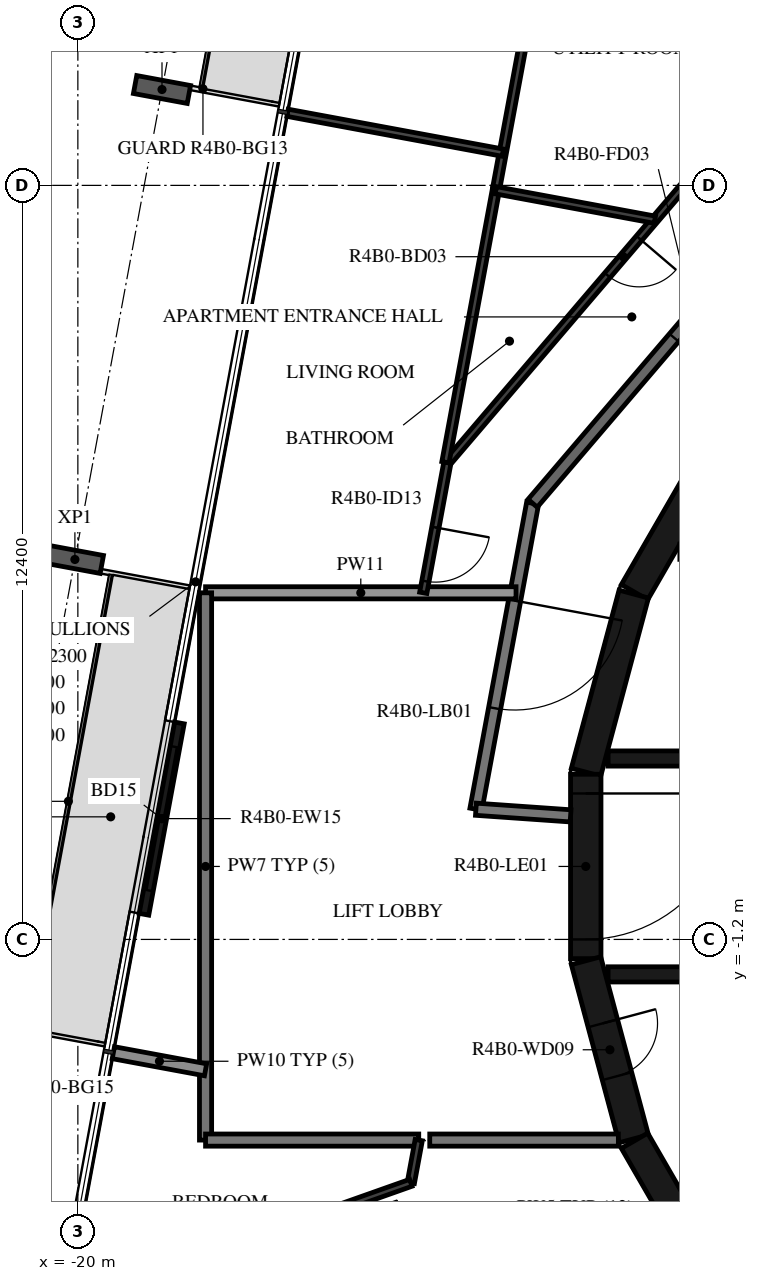
"""IFC4 building model, lengths in metres.
Left out: names, types, materials, properties, quantities, classifications, styles, units other than length and angle.
Written with IfcOpenShell. Run it as: python <this file> out.ifc"""

import sys

from ifc_helpers import new_model, si_unit, direction, frame, frame_2d, origin, origin_2d, place, context, subcontext, project, spatial, rectangle, i_section, extrude, element, fill, save


model = new_model("IFC4")
c1 = context("Model", 3, precision=1e-05, world=origin(), true_north=direction((0.0, 1.0)))
c2 = subcontext(c1, "Body", "Model", "MODEL_VIEW")
j1 = project(units=[si_unit("LENGTHUNIT", "METRE"), si_unit("PLANEANGLEUNIT", "RADIAN")], contexts=[c1])
p1 = place(None, origin())
s1 = spatial("IfcSite", under=j1, at=p1, CompositionType="ELEMENT")
p2 = place(p1, origin())
s2 = spatial("IfcBuilding", under=s1, at=p2, CompositionType="ELEMENT")
p3 = place(p2, frame((0.0, 0.0, 165.7)))
s3 = spatial("IfcBuildingStorey", under=s2, at=p3, CompositionType="ELEMENT", Elevation=165.7)
for number, where, z_axis, x_axis in (
    (1, (-18.616, 12.777, -0.38), (0.0, 0.0, 1.0), (0.182, 0.983, 0.0)),
    (2, (-20.049, 5.048, -0.38), (0.0, 0.0, 1.0), (0.182, 0.983, 0.0)),
):
    element("IfcColumn", number, at=place(p3, frame(where, z_axis=z_axis, x_axis=x_axis)), inside=s3, PredefinedType="COLUMN", context=c2, shape_type="SweptSolid", body=[
        extrude(i_section(OverallWidth=0.3, OverallDepth=0.9, WebThickness=0.019, FlangeThickness=0.035, FilletRadius=0.03, at=origin_2d()), origin(), (0.0, 0.0, 1.0), 3.5),
    ])
p4 = place(p3, frame((-18.33, 2.36, 0.0), z_axis=(0.0, 0.0, 1.0), x_axis=(-0.18226136951, -0.983250117307, 0.0)))
e3 = element("IfcWall", 3, at=p4, inside=s3, PredefinedType="STANDARD", context=c2, shape_type="SweptSolid", body=[
    extrude(rectangle(XDim=3.2, YDim=0.16, at=frame_2d((1.6, 0.0))), origin(), (0.0, 0.0, 1.0), 3.12),
])
p5 = place(p4, frame((0.4, 0.0, 0.0)))
e4 = element("IfcOpeningElement", 4, at=p5, cuts=e3, PredefinedType="OPENING", context=c2, shape_type="SweptSolid", body=[
    extrude(rectangle(XDim=2.4, YDim=2.4, at=frame_2d((1.2, 1.2))), frame((0.0, 0.09, 0.0), z_axis=(0.0, -1.0, 0.0), x_axis=(1.0, 0.0, 0.0)), (0.0, 0.0, 1.0), 0.18),
])
for number, where, z_axis, x_axis in (
    (5, (-9.329, 7.137, 0.0), (0.0, 0.0, 1.0), (-0.5, -0.866, 0.0)),
    (6, (-10.858, 4.479, 0.0), (0.0, 0.0, 1.0), (-0.259, -0.966, 0.0)),
):
    element("IfcWall", number, at=place(p3, frame(where, z_axis=z_axis, x_axis=x_axis)), inside=s3, PredefinedType="SHEAR", context=c2, shape_type="SweptSolid", body=[
        extrude(rectangle(XDim=3.033, YDim=0.5, at=frame_2d((1.516, 0.0))), origin(), (0.0, 0.0, 1.0), 3.12),
    ])
p6 = place(p3, frame((-11.647, 1.516, 0.0), z_axis=(0.0, 0.0, 1.0), x_axis=(0.0, -1.0, 0.0)))
e7 = element("IfcWall", 7, at=p6, inside=s3, PredefinedType="SHEAR", context=c2, shape_type="SweptSolid", body=[
    extrude(rectangle(XDim=3.033, YDim=0.5, at=frame_2d((1.516, 0.0))), origin(), (0.0, 0.0, 1.0), 3.12),
])
p7 = place(p6, frame((0.316, 0.0, 0.0)))
e8 = element("IfcOpeningElement", 8, at=p7, cuts=e7, PredefinedType="OPENING", context=c2, shape_type="SweptSolid", body=[
    extrude(rectangle(XDim=2.4, YDim=2.1, at=frame_2d((1.2, 1.05))), frame((0.0, 0.26, 0.0), z_axis=(0.0, -1.0, 0.0), x_axis=(1.0, 0.0, 0.0)), (0.0, 0.0, 1.0), 0.52),
])
p8 = place(p3, frame((-11.643, -1.55, 0.0), z_axis=(0.0, 0.0, 1.0), x_axis=(0.258734743916, -0.965948410781, 0.0)))
e9 = element("IfcWall", 9, at=p8, inside=s3, PredefinedType="SHEAR", context=c2, shape_type="SweptSolid", body=[
    extrude(rectangle(XDim=3.033, YDim=0.5, at=frame_2d((1.516, 0.0))), origin(), (0.0, 0.0, 1.0), 3.12),
])
p9 = place(p8, frame((1.066, 0.0, 0.0)))
e10 = element("IfcOpeningElement", 10, at=p9, cuts=e9, PredefinedType="OPENING", context=c2, shape_type="SweptSolid", body=[
    extrude(rectangle(XDim=0.9, YDim=2.1, at=frame_2d((0.45, 1.05))), frame((0.0, 0.26, 0.0), z_axis=(0.0, -1.0, 0.0), x_axis=(1.0, 0.0, 0.0)), (0.0, 0.0, 1.0), 0.52),
])
p10 = place(p3, frame((-10.845, -4.51, 0.0), z_axis=(0.0, 0.0, 1.0), x_axis=(0.500087131594, -0.865975092491, 0.0)))
e11 = element("IfcWall", 11, at=p10, inside=s3, PredefinedType="SHEAR", context=c2, shape_type="SweptSolid", body=[
    extrude(rectangle(XDim=3.033, YDim=0.5, at=frame_2d((1.516, 0.0))), origin(), (0.0, 0.0, 1.0), 3.12),
])
p11 = place(p3, frame((-11.28, 1.775, 0.0), z_axis=(0.0, 0.0, 1.0), x_axis=(1.0, 0.0, 0.0)))
e12 = element("IfcWall", 12, at=p11, inside=s3, PredefinedType="SHEAR", context=c2, shape_type="SweptSolid", body=[
    extrude(rectangle(XDim=14.38, YDim=0.25, at=frame_2d((7.19, 0.0))), origin(), (0.0, 0.0, 1.0), 3.12),
])
p12 = place(p11, frame((10.73, 0.0, 0.0)))
e13 = element("IfcOpeningElement", 13, at=p12, cuts=e12, PredefinedType="OPENING", context=c2, shape_type="SweptSolid", body=[
    extrude(rectangle(XDim=1.1, YDim=2.1, at=frame_2d((0.55, 1.05))), frame((0.0, 0.135, 0.0), z_axis=(0.0, -1.0, 0.0), x_axis=(1.0, 0.0, 0.0)), (0.0, 0.0, 1.0), 0.27),
])
p13 = place(p11, frame((12.88, 0.0, 0.0)))
e14 = element("IfcOpeningElement", 14, at=p13, cuts=e12, PredefinedType="OPENING", context=c2, shape_type="SweptSolid", body=[
    extrude(rectangle(XDim=1.1, YDim=2.1, at=frame_2d((0.55, 1.05))), frame((0.0, 0.135, 0.0), z_axis=(0.0, -1.0, 0.0), x_axis=(1.0, 0.0, 0.0)), (0.0, 0.0, 1.0), 0.27),
])
p14 = place(p11, frame((3.305, 0.0, 0.0)))
e15 = element("IfcOpeningElement", 15, at=p14, cuts=e12, PredefinedType="OPENING", context=c2, shape_type="SweptSolid", body=[
    extrude(rectangle(XDim=0.9, YDim=2.1, at=frame_2d((0.45, 1.05))), frame((0.0, 0.135, 0.0), z_axis=(0.0, -1.0, 0.0), x_axis=(1.0, 0.0, 0.0)), (0.0, 0.0, 1.0), 0.27),
])
p15 = place(p11, frame((7.605, 0.0, 0.0)))
e16 = element("IfcOpeningElement", 16, at=p15, cuts=e12, PredefinedType="OPENING", context=c2, shape_type="SweptSolid", body=[
    extrude(rectangle(XDim=0.9, YDim=2.1, at=frame_2d((0.45, 1.05))), frame((0.0, 0.135, 0.0), z_axis=(0.0, -1.0, 0.0), x_axis=(1.0, 0.0, 0.0)), (0.0, 0.0, 1.0), 0.27),
])
p16 = place(p3, frame((-11.28, -1.775, 0.0), z_axis=(0.0, 0.0, 1.0), x_axis=(1.0, 0.0, 0.0)))
e17 = element("IfcWall", 17, at=p16, inside=s3, PredefinedType="SHEAR", context=c2, shape_type="SweptSolid", body=[
    extrude(rectangle(XDim=14.38, YDim=0.25, at=frame_2d((7.19, 0.0))), origin(), (0.0, 0.0, 1.0), 3.12),
])
p17 = place(p16, frame((12.88, 0.0, 0.0)))
e18 = element("IfcOpeningElement", 18, at=p17, cuts=e17, PredefinedType="OPENING", context=c2, shape_type="SweptSolid", body=[
    extrude(rectangle(XDim=1.1, YDim=2.1, at=frame_2d((0.55, 1.05))), frame((0.0, 0.135, 0.0), z_axis=(0.0, -1.0, 0.0), x_axis=(1.0, 0.0, 0.0)), (0.0, 0.0, 1.0), 0.27),
])
p18 = place(p16, frame((8.68, 0.0, 0.0)))
e19 = element("IfcOpeningElement", 19, at=p18, cuts=e17, PredefinedType="OPENING", context=c2, shape_type="SweptSolid", body=[
    extrude(rectangle(XDim=0.9, YDim=2.1, at=frame_2d((0.45, 1.05))), frame((0.0, 0.135, 0.0), z_axis=(0.0, -1.0, 0.0), x_axis=(1.0, 0.0, 0.0)), (0.0, 0.0, 1.0), 0.27),
])
p19 = place(p3, frame((-12.521, 5.972, 0.0), z_axis=(0.0, 0.0, 1.0), x_axis=(-0.182251559718, -0.983251935661, 0.0)))
e20 = element("IfcWall", 20, at=p19, inside=s3, PredefinedType="STANDARD", context=c2, shape_type="SweptSolid", body=[
    extrude(rectangle(XDim=5.117, YDim=0.2, at=frame_2d((2.559, 0.0))), origin(), (0.0, 0.0, 1.0), 3.12),
])
p20 = place(p19, frame((1.627, 0.0, 0.0)))
e21 = element("IfcOpeningElement", 21, at=p20, cuts=e20, PredefinedType="OPENING", context=c2, shape_type="SweptSolid", body=[
    extrude(rectangle(XDim=1.8, YDim=2.1, at=frame_2d((0.9, 1.05))), frame((0.0, 0.11, 0.0), z_axis=(0.0, -1.0, 0.0), x_axis=(1.0, 0.0, 0.0)), (0.0, 0.0, 1.0), 0.22),
])
p21 = place(p3, frame((-13.454, 0.941, 0.0), z_axis=(0.0, 0.0, 1.0), x_axis=(0.99755155062, -0.069934997354, 0.0)))
e22 = element("IfcWall", 22, at=p21, inside=s3, PredefinedType="STANDARD", context=c2, shape_type="SweptSolid", body=[
    extrude(rectangle(XDim=1.561, YDim=0.2, at=frame_2d((0.78, 0.0))), origin(), (0.0, 0.0, 1.0), 3.12),
])
p22 = place(p3, frame((-7.858, 11.433, 0.0), z_axis=(0.0, 0.0, 1.0), x_axis=(-0.649440801937, -0.760412154545, 0.0)))
e23 = element("IfcWall", 23, at=p22, inside=s3, PredefinedType="STANDARD", context=c2, shape_type="SweptSolid", body=[
    extrude(rectangle(XDim=7.181, YDim=0.2, at=frame_2d((3.59, 0.0))), origin(), (0.0, 0.0, 1.0), 3.12),
])
p23 = place(p22, frame((2.6, 0.0, 0.0)))
e24 = element("IfcOpeningElement", 24, at=p23, cuts=e23, PredefinedType="OPENING", context=c2, shape_type="SweptSolid", body=[
    extrude(rectangle(XDim=1.0, YDim=2.1, at=frame_2d((0.5, 1.05))), frame((0.0, 0.11, 0.0), z_axis=(0.0, -1.0, 0.0), x_axis=(1.0, 0.0, 0.0)), (0.0, 0.0, 1.0), 0.22),
])
p24 = place(p3, frame((-12.794, 4.5, 0.0), z_axis=(0.0, 0.0, 1.0), x_axis=(-1.0, 0.0, 0.0)))
e25 = element("IfcWall", 25, at=p24, inside=s3, PredefinedType="STANDARD", context=c2, shape_type="SweptSolid", body=[
    extrude(rectangle(XDim=5.106, YDim=0.2, at=frame_2d((2.553, 0.0))), origin(), (0.0, 0.0, 1.0), 2.73),
])
p25 = place(p3, frame((-17.9, 4.5, 0.0), z_axis=(0.0, 0.0, 1.0), x_axis=(0.0, -1.0, 0.0)))
e26 = element("IfcWall", 26, at=p25, inside=s3, PredefinedType="STANDARD", context=c2, shape_type="SweptSolid", body=[
    extrude(rectangle(XDim=9.0, YDim=0.2, at=frame_2d((4.5, 0.0))), origin(), (0.0, 0.0, 1.0), 3.12),
])
p26 = place(p3, frame((-14.213, -4.5, 0.0), z_axis=(0.0, 0.0, 1.0), x_axis=(1.0, 0.0, 0.0)))
e27 = element("IfcWall", 27, at=p26, inside=s3, PredefinedType="STANDARD", context=c2, shape_type="SweptSolid", body=[
    extrude(rectangle(XDim=3.102, YDim=0.2, at=frame_2d((1.551, 0.0))), origin(), (0.0, 0.0, 1.0), 3.12),
])
p27 = place(p3, frame((-17.9, -4.5, 0.0), z_axis=(0.0, 0.0, 1.0), x_axis=(1.0, 0.0, 0.0)))
e28 = element("IfcWall", 28, at=p27, inside=s3, PredefinedType="STANDARD", context=c2, shape_type="SweptSolid", body=[
    extrude(rectangle(XDim=3.506, YDim=0.2, at=frame_2d((1.753, 0.0))), origin(), (0.0, 0.0, 1.0), 3.12),
])
p28 = place(p3, frame((-19.416, -3.063, 0.0), z_axis=(0.0, 0.0, 1.0), x_axis=(0.983258901558, -0.182213974512, 0.0)))
e29 = element("IfcWall", 29, at=p28, inside=s3, PredefinedType="STANDARD", context=c2, shape_type="SweptSolid", body=[
    extrude(rectangle(XDim=1.542, YDim=0.2, at=frame_2d((0.771, 0.0))), origin(), (0.0, 0.0, 1.0), 2.73),
])
p29 = place(p3, frame((-10.402, 15.882, 0.0), z_axis=(0.0, 0.0, 1.0), x_axis=(0.33382476952, -0.942635148536, 0.0)))
e30 = element("IfcWall", 30, at=p29, inside=s3, PredefinedType="PARTITIONING", context=c2, shape_type="SweptSolid", body=[
    extrude(rectangle(XDim=3.838, YDim=0.12, at=frame_2d((1.919, 0.0))), origin(), (0.0, 0.0, 1.0), 3.12),
])
p30 = place(p3, frame((-9.12, 12.264, 0.0), z_axis=(0.0, 0.0, 1.0), x_axis=(-0.649444490942, -0.760409003882, 0.0)))
e31 = element("IfcWall", 31, at=p30, inside=s3, PredefinedType="PARTITIONING", context=c2, shape_type="SweptSolid", body=[
    extrude(rectangle(XDim=7.395, YDim=0.12, at=frame_2d((3.697, 0.0))), origin(), (0.0, 0.0, 1.0), 3.12),
])
p31 = place(p30, frame((2.542, 0.0, 0.0)))
e32 = element("IfcOpeningElement", 32, at=p31, cuts=e31, PredefinedType="OPENING", context=c2, shape_type="SweptSolid", body=[
    extrude(rectangle(XDim=0.8, YDim=2.1, at=frame_2d((0.4, 1.05))), frame((0.0, 0.07, 0.0), z_axis=(0.0, -1.0, 0.0), x_axis=(1.0, 0.0, 0.0)), (0.0, 0.0, 1.0), 0.14),
])
p32 = place(p3, frame((-13.923, 6.641, 0.0), z_axis=(0.0, 0.0, 1.0), x_axis=(-0.182209715759, -0.983259690765, 0.0)))
e33 = element("IfcWall", 33, at=p32, inside=s3, PredefinedType="PARTITIONING", context=c2, shape_type="SweptSolid", body=[
    extrude(rectangle(XDim=2.177, YDim=0.12, at=frame_2d((1.089, 0.0))), origin(), (0.0, 0.0, 1.0), 3.12),
])
p33 = place(p32, frame((1.083, 0.0, 0.0)))
e34 = element("IfcOpeningElement", 34, at=p33, cuts=e33, PredefinedType="OPENING", context=c2, shape_type="SweptSolid", body=[
    extrude(rectangle(XDim=0.9, YDim=2.1, at=frame_2d((0.45, 1.05))), frame((0.0, 0.07, 0.0), z_axis=(0.0, -1.0, 0.0), x_axis=(1.0, 0.0, 0.0)), (0.0, 0.0, 1.0), 0.14),
])
p34 = place(p3, frame((-13.955, 6.647, 0.0), z_axis=(0.0, 0.0, 1.0), x_axis=(0.182264522222, 0.983249532896, 0.0)))
e35 = element("IfcWall", 35, at=p34, inside=s3, PredefinedType="PARTITIONING", context=c2, shape_type="SweptSolid", body=[
    extrude(rectangle(XDim=4.589, YDim=0.12, at=frame_2d((2.294, 0.0))), origin(), (0.0, 0.0, 1.0), 3.12),
])
p35 = place(p3, frame((-11.396, 20.453, 0.0), z_axis=(0.0, 0.0, 1.0), x_axis=(-0.182223370439, -0.983257160292, 0.0)))
e36 = element("IfcWall", 36, at=p35, inside=s3, PredefinedType="PARTITIONING", context=c2, shape_type="SweptSolid", body=[
    extrude(rectangle(XDim=9.452, YDim=0.12, at=frame_2d((4.726, 0.0))), origin(), (0.0, 0.0, 1.0), 3.12),
])
p36 = place(p35, frame((3.406, 0.0, 0.0)))
e37 = element("IfcOpeningElement", 37, at=p36, cuts=e36, PredefinedType="OPENING", context=c2, shape_type="SweptSolid", body=[
    extrude(rectangle(XDim=0.9, YDim=2.1, at=frame_2d((0.45, 1.05))), frame((0.0, 0.07, 0.0), z_axis=(0.0, -1.0, 0.0), x_axis=(1.0, 0.0, 0.0)), (0.0, 0.0, 1.0), 0.14),
])
p37 = place(p35, frame((0.2, 0.0, 0.0)))
e38 = element("IfcOpeningElement", 38, at=p37, cuts=e36, PredefinedType="OPENING", context=c2, shape_type="SweptSolid", body=[
    extrude(rectangle(XDim=0.9, YDim=2.1, at=frame_2d((0.45, 1.05))), frame((0.0, 0.07, 0.0), z_axis=(0.0, -1.0, 0.0), x_axis=(1.0, 0.0, 0.0)), (0.0, 0.0, 1.0), 0.14),
])
p38 = place(p3, frame((-13.126, 11.12, 0.0), z_axis=(0.0, 0.0, 1.0), x_axis=(0.983257646361, -0.182220747645, 0.0)))
e39 = element("IfcWall", 39, at=p38, inside=s3, PredefinedType="PARTITIONING", context=c2, shape_type="SweptSolid", body=[
    extrude(rectangle(XDim=2.659, YDim=0.12, at=frame_2d((1.33, 0.0))), origin(), (0.0, 0.0, 1.0), 3.12),
])
p39 = place(p3, frame((-16.552, 12.394, 0.0), z_axis=(0.0, 0.0, 1.0), x_axis=(0.983257712156, -0.182220392618, 0.0)))
e40 = element("IfcWall", 40, at=p39, inside=s3, PredefinedType="PARTITIONING", context=c2, shape_type="SweptSolid", body=[
    extrude(rectangle(XDim=3.6, YDim=0.12, at=frame_2d((1.8, 0.0))), origin(), (0.0, 0.0, 1.0), 2.73),
])
p40 = place(p3, frame((-14.394, -4.5, 0.0), z_axis=(0.0, 0.0, 1.0), x_axis=(-0.182101494457, -0.983279739299, 0.0)))
e41 = element("IfcWall", 41, at=p40, inside=s3, PredefinedType="PARTITIONING", context=c2, shape_type="SweptSolid", body=[
    extrude(rectangle(XDim=0.715, YDim=0.12, at=frame_2d((0.357, 0.0))), origin(), (0.0, 0.0, 1.0), 3.12),
])
p41 = place(p3, frame((-14.524, -5.203, 0.0), z_axis=(0.0, 0.0, 1.0), x_axis=(-0.942657704592, -0.333761070187, 0.0)))
e42 = element("IfcWall", 42, at=p41, inside=s3, PredefinedType="PARTITIONING", context=c2, shape_type="SweptSolid", body=[
    extrude(rectangle(XDim=1.208, YDim=0.12, at=frame_2d((0.604, 0.0))), origin(), (0.0, 0.0, 1.0), 3.12),
])
p42 = place(p5, origin())
e43 = element("IfcDoor", 43, at=p42, inside=s3, OperationType="DOUBLE_DOOR_SLIDING", PredefinedType="DOOR", context=c2, shape_type="SweptSolid", body=[
    extrude(rectangle(XDim=2.4, YDim=2.4, at=frame_2d((1.2, 1.2))), frame((0.0, 0.025, 0.0), z_axis=(0.0, -1.0, 0.0), x_axis=(1.0, 0.0, 0.0)), (0.0, 0.0, 1.0), 0.05),
])
fill(e4, e43)
p43 = place(p7, origin())
e44 = element("IfcDoor", 44, at=p43, inside=s3, OperationType="DOUBLE_DOOR_SINGLE_SWING", PredefinedType="DOOR", context=c2, shape_type="SweptSolid", body=[
    extrude(rectangle(XDim=2.4, YDim=2.1, at=frame_2d((1.2, 1.05))), frame((0.0, 0.025, 0.0), z_axis=(0.0, -1.0, 0.0), x_axis=(1.0, 0.0, 0.0)), (0.0, 0.0, 1.0), 0.05),
])
fill(e8, e44)
p44 = place(p9, origin())
e45 = element("IfcDoor", 45, at=p44, inside=s3, OperationType="SINGLE_SWING_LEFT", PredefinedType="DOOR", context=c2, shape_type="SweptSolid", body=[
    extrude(rectangle(XDim=0.9, YDim=2.1, at=frame_2d((0.45, 1.05))), frame((0.0, 0.025, 0.0), z_axis=(0.0, -1.0, 0.0), x_axis=(1.0, 0.0, 0.0)), (0.0, 0.0, 1.0), 0.05),
])
fill(e10, e45)
p45 = place(p23, origin())
e46 = element("IfcDoor", 46, at=p45, inside=s3, OperationType="SINGLE_SWING_LEFT", PredefinedType="DOOR", context=c2, shape_type="SweptSolid", body=[
    extrude(rectangle(XDim=1.0, YDim=2.1, at=frame_2d((0.5, 1.05))), frame((0.0, 0.025, 0.0), z_axis=(0.0, -1.0, 0.0), x_axis=(1.0, 0.0, 0.0)), (0.0, 0.0, 1.0), 0.05),
])
fill(e24, e46)
p46 = place(p31, origin())
e47 = element("IfcDoor", 47, at=p46, inside=s3, OperationType="SINGLE_SWING_LEFT", PredefinedType="DOOR", context=c2, shape_type="SweptSolid", body=[
    extrude(rectangle(XDim=0.8, YDim=2.1, at=frame_2d((0.4, 1.05))), frame((0.0, 0.025, 0.0), z_axis=(0.0, -1.0, 0.0), x_axis=(1.0, 0.0, 0.0)), (0.0, 0.0, 1.0), 0.05),
])
fill(e32, e47)
p47 = place(p33, origin())
e48 = element("IfcDoor", 48, at=p47, inside=s3, OperationType="SINGLE_SWING_LEFT", PredefinedType="DOOR", context=c2, shape_type="SweptSolid", body=[
    extrude(rectangle(XDim=0.9, YDim=2.1, at=frame_2d((0.45, 1.05))), frame((0.0, 0.025, 0.0), z_axis=(0.0, -1.0, 0.0), x_axis=(1.0, 0.0, 0.0)), (0.0, 0.0, 1.0), 0.05),
])
fill(e34, e48)
p48 = place(p20, origin())
e49 = element("IfcDoor", 49, at=p48, inside=s3, OperationType="DOUBLE_DOOR_SINGLE_SWING", PredefinedType="DOOR", context=c2, shape_type="SweptSolid", body=[
    extrude(rectangle(XDim=1.8, YDim=2.1, at=frame_2d((0.9, 1.05))), frame((0.0, 0.025, 0.0), z_axis=(0.0, -1.0, 0.0), x_axis=(1.0, 0.0, 0.0)), (0.0, 0.0, 1.0), 0.05),
])
fill(e21, e49)
save(model, sys.argv[1])
